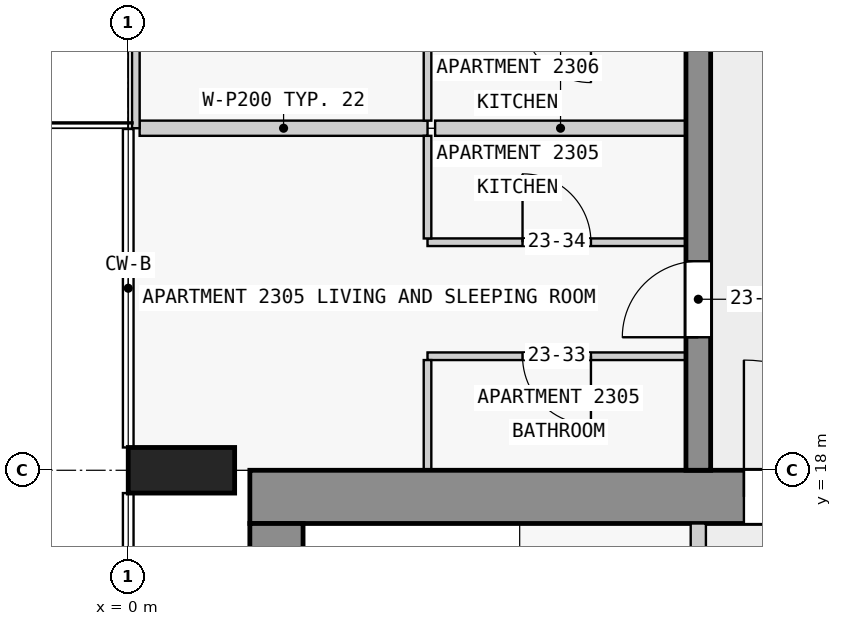
"""IFC4 building model, lengths in metres.
Left out: names, types, materials, properties, quantities, classifications, styles, units other than length and angle.
Written with IfcOpenShell. Run it as: python <this file> out.ifc"""

import sys

from ifc_helpers import new_model, si_unit, direction, frame, frame_2d, origin, origin_2d, place, context, subcontext, project, spatial, rectangle, extrude, element, fill, save


model = new_model("IFC4")
c1 = context("Model", 3, precision=1e-05, world=origin(), true_north=direction((0.0, 1.0)))
c2 = subcontext(c1, "Body", "Model", "MODEL_VIEW")
j1 = project(units=[si_unit("LENGTHUNIT", "METRE"), si_unit("PLANEANGLEUNIT", "RADIAN")], contexts=[c1])
p1 = place(None, origin())
s1 = spatial("IfcSite", under=j1, at=p1, CompositionType="ELEMENT")
p2 = place(p1, origin())
s2 = spatial("IfcBuilding", under=s1, at=p2, CompositionType="ELEMENT")
p3 = place(p2, frame((0.0, 0.0, 92.3)))
s3 = spatial("IfcBuildingStorey", under=s2, at=p3, CompositionType="ELEMENT", Elevation=92.3)
p4 = place(p3, frame((0.7, 18.0, 0.0), z_axis=(0.0, 0.0, 1.0), x_axis=(0.0, 1.0, 0.0)))
e1 = element("IfcColumn", 1, at=p4, inside=s3, PredefinedType="COLUMN", context=c2, shape_type="SweptSolid", body=[
    extrude(rectangle(XDim=0.6, YDim=1.4, at=origin_2d()), origin(), (0.0, 0.0, 1.0), 3.5),
])
p5 = place(p3, frame((1.6, 17.65, 0.0), z_axis=(0.0, 0.0, 1.0), x_axis=(1.0, 0.0, 0.0)))
e2 = element("IfcWall", 2, at=p5, inside=s3, PredefinedType="SHEAR", context=c2, shape_type="SweptSolid", body=[
    extrude(rectangle(XDim=20.9, YDim=0.7, at=frame_2d((10.45, 0.0))), origin(), (0.0, 0.0, 1.0), 3.25),
])
p6 = place(p5, frame((6.5, 0.0, 0.0)))
e3 = element("IfcOpeningElement", 3, at=p6, cuts=e2, PredefinedType="OPENING", context=c2, shape_type="SweptSolid", body=[
    extrude(rectangle(XDim=1.8, YDim=2.1, at=frame_2d((0.9, 1.05))), frame((0.0, 0.36, 0.0), z_axis=(0.0, -1.0, 0.0), x_axis=(1.0, 0.0, 0.0)), (0.0, 0.0, 1.0), 0.72),
])
p7 = place(p3, frame((1.95, 2.5, 0.0), z_axis=(0.0, 0.0, 1.0), x_axis=(0.0, 1.0, 0.0)))
e4 = element("IfcWall", 4, at=p7, inside=s3, PredefinedType="SHEAR", context=c2, shape_type="SweptSolid", body=[
    extrude(rectangle(XDim=14.8, YDim=0.7, at=frame_2d((7.4, 0.0))), origin(), (0.0, 0.0, 1.0), 3.25),
])
p8 = place(p3, frame((7.5, 18.0, 0.0), z_axis=(0.0, 0.0, 1.0), x_axis=(0.0, 1.0, 0.0)))
e5 = element("IfcWall", 5, at=p8, inside=s3, PredefinedType="SHEAR", context=c2, shape_type="SweptSolid", body=[
    extrude(rectangle(XDim=27.0, YDim=0.325, at=frame_2d((13.5, 0.0))), origin(), (0.0, 0.0, 1.0), 3.25),
])
p9 = place(p8, frame((1.75, 0.0, 0.0)))
e6 = element("IfcOpeningElement", 6, at=p9, cuts=e5, PredefinedType="OPENING", context=c2, shape_type="SweptSolid", body=[
    extrude(rectangle(XDim=1.0, YDim=2.1, at=frame_2d((0.5, 1.05))), frame((0.0, 0.172, 0.0), z_axis=(0.0, -1.0, 0.0), x_axis=(1.0, 0.0, 0.0)), (0.0, 0.0, 1.0), 0.345),
])
p10 = place(p8, frame((6.25, 0.0, 0.0)))
e7 = element("IfcOpeningElement", 7, at=p10, cuts=e5, PredefinedType="OPENING", context=c2, shape_type="SweptSolid", body=[
    extrude(rectangle(XDim=1.0, YDim=2.1, at=frame_2d((0.5, 1.05))), frame((0.0, 0.172, 0.0), z_axis=(0.0, -1.0, 0.0), x_axis=(1.0, 0.0, 0.0)), (0.0, 0.0, 1.0), 0.345),
])
p11 = place(p8, frame((10.85, 0.0, 0.0)))
e8 = element("IfcOpeningElement", 8, at=p11, cuts=e5, PredefinedType="OPENING", context=c2, shape_type="SweptSolid", body=[
    extrude(rectangle(XDim=0.9, YDim=2.1, at=frame_2d((0.45, 1.05))), frame((0.0, 0.172, 0.0), z_axis=(0.0, -1.0, 0.0), x_axis=(1.0, 0.0, 0.0)), (0.0, 0.0, 1.0), 0.345),
])
p12 = place(p8, frame((15.25, 0.0, 0.0)))
e9 = element("IfcOpeningElement", 9, at=p12, cuts=e5, PredefinedType="OPENING", context=c2, shape_type="SweptSolid", body=[
    extrude(rectangle(XDim=1.0, YDim=2.1, at=frame_2d((0.5, 1.05))), frame((0.0, 0.172, 0.0), z_axis=(0.0, -1.0, 0.0), x_axis=(1.0, 0.0, 0.0)), (0.0, 0.0, 1.0), 0.345),
])
p13 = place(p8, frame((19.85, 0.0, 0.0)))
e10 = element("IfcOpeningElement", 10, at=p13, cuts=e5, PredefinedType="OPENING", context=c2, shape_type="SweptSolid", body=[
    extrude(rectangle(XDim=0.9, YDim=2.1, at=frame_2d((0.45, 1.05))), frame((0.0, 0.172, 0.0), z_axis=(0.0, -1.0, 0.0), x_axis=(1.0, 0.0, 0.0)), (0.0, 0.0, 1.0), 0.345),
])
p14 = place(p8, frame((23.25, 0.0, 0.0)))
e11 = element("IfcOpeningElement", 11, at=p14, cuts=e5, PredefinedType="OPENING", context=c2, shape_type="SweptSolid", body=[
    extrude(rectangle(XDim=0.9, YDim=2.1, at=frame_2d((0.45, 1.05))), frame((0.0, 0.172, 0.0), z_axis=(0.0, -1.0, 0.0), x_axis=(1.0, 0.0, 0.0)), (0.0, 0.0, 1.0), 0.345),
])
p15 = place(p8, frame((25.45, 0.0, 0.0)))
e12 = element("IfcOpeningElement", 12, at=p15, cuts=e5, PredefinedType="OPENING", context=c2, shape_type="SweptSolid", body=[
    extrude(rectangle(XDim=1.0, YDim=2.1, at=frame_2d((0.5, 1.05))), frame((0.0, 0.172, 0.0), z_axis=(0.0, -1.0, 0.0), x_axis=(1.0, 0.0, 0.0)), (0.0, 0.0, 1.0), 0.345),
])
p16 = place(p3, frame((0.1, 22.5, 0.0), z_axis=(0.0, 0.0, 1.0), x_axis=(0.0, 1.0, 0.0)))
e13 = element("IfcWall", 13, at=p16, inside=s3, PredefinedType="STANDARD", context=c2, shape_type="SweptSolid", body=[
    extrude(rectangle(XDim=4.5, YDim=0.1, at=frame_2d((2.25, 0.0))), origin(), (0.0, 0.0, 1.0), 3.25),
])
p17 = place(p16, frame((1.05, 0.0, 0.0)))
e14 = element("IfcOpeningElement", 14, at=p17, cuts=e13, PredefinedType="OPENING", context=c2, shape_type="SweptSolid", body=[
    extrude(rectangle(XDim=2.4, YDim=2.4, at=frame_2d((1.2, 1.2))), frame((0.0, 0.06, 0.0), z_axis=(0.0, -1.0, 0.0), x_axis=(1.0, 0.0, 0.0)), (0.0, 0.0, 1.0), 0.12),
])
p18 = place(p3, frame((7.5, 10.1, 0.0), z_axis=(0.0, 0.0, 1.0), x_axis=(0.0, 1.0, 0.0)))
e15 = element("IfcWall", 15, at=p18, inside=s3, PredefinedType="PARTITIONING", context=c2, shape_type="SweptSolid", body=[
    extrude(rectangle(XDim=7.2, YDim=0.2, at=frame_2d((3.6, 0.0))), origin(), (0.0, 0.0, 1.0), 3.25),
])
p19 = place(p18, frame((1.05, 0.0, 0.0)))
e16 = element("IfcOpeningElement", 16, at=p19, cuts=e15, PredefinedType="OPENING", context=c2, shape_type="SweptSolid", body=[
    extrude(rectangle(XDim=0.9, YDim=2.1, at=frame_2d((0.45, 1.05))), frame((0.0, 0.11, 0.0), z_axis=(0.0, -1.0, 0.0), x_axis=(1.0, 0.0, 0.0)), (0.0, 0.0, 1.0), 0.22),
])
p20 = place(p18, frame((4.65, 0.0, 0.0)))
e17 = element("IfcOpeningElement", 17, at=p20, cuts=e15, PredefinedType="OPENING", context=c2, shape_type="SweptSolid", body=[
    extrude(rectangle(XDim=0.9, YDim=2.1, at=frame_2d((0.45, 1.05))), frame((0.0, 0.11, 0.0), z_axis=(0.0, -1.0, 0.0), x_axis=(1.0, 0.0, 0.0)), (0.0, 0.0, 1.0), 0.22),
])
p21 = place(p3, frame((7.337, 19.5, 0.0), z_axis=(0.0, 0.0, 1.0), x_axis=(-1.0, 0.0, 0.0)))
e18 = element("IfcWall", 18, at=p21, inside=s3, PredefinedType="PARTITIONING", context=c2, shape_type="SweptSolid", body=[
    extrude(rectangle(XDim=3.4, YDim=0.1, at=frame_2d((1.7, 0.0))), origin(), (0.0, 0.0, 1.0), 3.25),
])
p22 = place(p21, frame((1.25, 0.0, 0.0)))
e19 = element("IfcOpeningElement", 19, at=p22, cuts=e18, PredefinedType="OPENING", context=c2, shape_type="SweptSolid", body=[
    extrude(rectangle(XDim=0.9, YDim=2.1, at=frame_2d((0.45, 1.05))), frame((0.0, 0.06, 0.0), z_axis=(0.0, -1.0, 0.0), x_axis=(1.0, 0.0, 0.0)), (0.0, 0.0, 1.0), 0.12),
])
p23 = place(p3, frame((3.938, 21.0, 0.0), z_axis=(0.0, 0.0, 1.0), x_axis=(1.0, 0.0, 0.0)))
e20 = element("IfcWall", 20, at=p23, inside=s3, PredefinedType="PARTITIONING", context=c2, shape_type="SweptSolid", body=[
    extrude(rectangle(XDim=3.4, YDim=0.1, at=frame_2d((1.7, 0.0))), origin(), (0.0, 0.0, 1.0), 3.25),
])
p24 = place(p23, frame((1.25, 0.0, 0.0)))
e21 = element("IfcOpeningElement", 21, at=p24, cuts=e20, PredefinedType="OPENING", context=c2, shape_type="SweptSolid", body=[
    extrude(rectangle(XDim=0.9, YDim=2.1, at=frame_2d((0.45, 1.05))), frame((0.0, 0.06, 0.0), z_axis=(0.0, -1.0, 0.0), x_axis=(1.0, 0.0, 0.0)), (0.0, 0.0, 1.0), 0.12),
])
p25 = place(p3, frame((7.337, 22.5, 0.0), z_axis=(0.0, 0.0, 1.0), x_axis=(-1.0, 0.0, 0.0)))
e22 = element("IfcWall", 22, at=p25, inside=s3, PredefinedType="PARTITIONING", context=c2, shape_type="SweptSolid", body=[
    extrude(rectangle(XDim=3.3, YDim=0.2, at=frame_2d((1.65, 0.0))), origin(), (0.0, 0.0, 1.0), 3.25),
])
p26 = place(p3, frame((0.15, 22.5, 0.0), z_axis=(0.0, 0.0, 1.0), x_axis=(1.0, 0.0, 0.0)))
e23 = element("IfcWall", 23, at=p26, inside=s3, PredefinedType="PARTITIONING", context=c2, shape_type="SweptSolid", body=[
    extrude(rectangle(XDim=3.788, YDim=0.2, at=frame_2d((1.894, 0.0))), origin(), (0.0, 0.0, 1.0), 3.25),
])
p27 = place(p3, frame((3.938, 19.45, 0.0), z_axis=(0.0, 0.0, 1.0), x_axis=(0.0, -1.0, 0.0)))
e24 = element("IfcWall", 24, at=p27, inside=s3, PredefinedType="PARTITIONING", context=c2, shape_type="SweptSolid", body=[
    extrude(rectangle(XDim=1.45, YDim=0.1, at=frame_2d((0.725, 0.0))), origin(), (0.0, 0.0, 1.0), 3.25),
])
for number, where, z_axis, x_axis in (
    (25, (3.938, 22.4, 0.0), (0.0, 0.0, 1.0), (0.0, -1.0, 0.0)),
    (26, (3.938, 23.95, 0.0), (0.0, 0.0, 1.0), (0.0, -1.0, 0.0)),
):
    element("IfcWall", number, at=place(p3, frame(where, z_axis=z_axis, x_axis=x_axis)), inside=s3, PredefinedType="PARTITIONING", context=c2, shape_type="SweptSolid", body=[
        extrude(rectangle(XDim=1.35, YDim=0.1, at=frame_2d((0.675, 0.0))), origin(), (0.0, 0.0, 1.0), 3.25),
    ])
p28 = place(p6, origin())
e27 = element("IfcDoor", 27, at=p28, inside=s3, OperationType="DOUBLE_DOOR_SINGLE_SWING", PredefinedType="DOOR", context=c2, shape_type="SweptSolid", body=[
    extrude(rectangle(XDim=1.8, YDim=2.1, at=frame_2d((0.9, 1.05))), frame((0.0, 0.025, 0.0), z_axis=(0.0, -1.0, 0.0), x_axis=(1.0, 0.0, 0.0)), (0.0, 0.0, 1.0), 0.05),
])
fill(e3, e27)
p29 = place(p9, origin())
e28 = element("IfcDoor", 28, at=p29, inside=s3, OperationType="SINGLE_SWING_LEFT", PredefinedType="DOOR", context=c2, shape_type="SweptSolid", body=[
    extrude(rectangle(XDim=1.0, YDim=2.1, at=frame_2d((0.5, 1.05))), frame((0.0, 0.025, 0.0), z_axis=(0.0, -1.0, 0.0), x_axis=(1.0, 0.0, 0.0)), (0.0, 0.0, 1.0), 0.05),
])
fill(e6, e28)
p30 = place(p22, origin())
e29 = element("IfcDoor", 29, at=p30, inside=s3, OperationType="SINGLE_SWING_LEFT", PredefinedType="DOOR", context=c2, shape_type="SweptSolid", body=[
    extrude(rectangle(XDim=0.9, YDim=2.1, at=frame_2d((0.45, 1.05))), frame((0.0, 0.025, 0.0), z_axis=(0.0, -1.0, 0.0), x_axis=(1.0, 0.0, 0.0)), (0.0, 0.0, 1.0), 0.05),
])
fill(e19, e29)
p31 = place(p24, origin())
e30 = element("IfcDoor", 30, at=p31, inside=s3, OperationType="SINGLE_SWING_LEFT", PredefinedType="DOOR", context=c2, shape_type="SweptSolid", body=[
    extrude(rectangle(XDim=0.9, YDim=2.1, at=frame_2d((0.45, 1.05))), frame((0.0, 0.025, 0.0), z_axis=(0.0, -1.0, 0.0), x_axis=(1.0, 0.0, 0.0)), (0.0, 0.0, 1.0), 0.05),
])
fill(e21, e30)
save(model, sys.argv[1])
